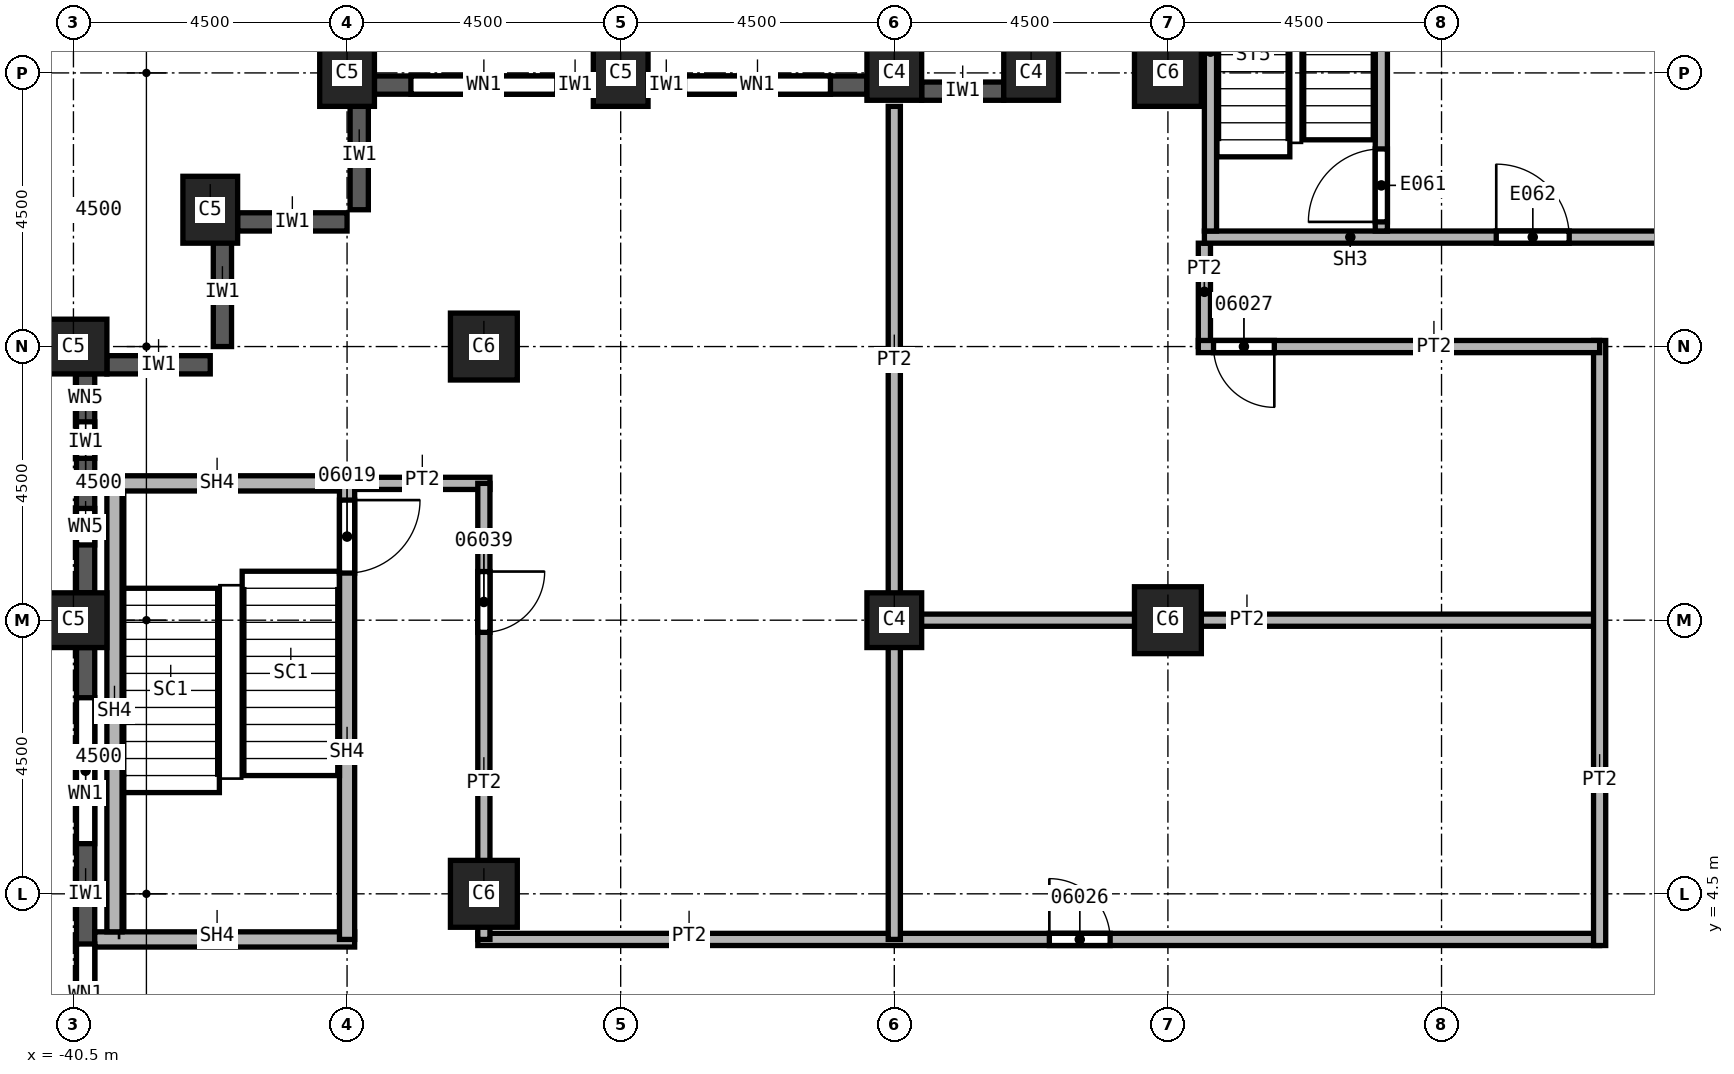
"""IFC4 building model, lengths in metres.
Left out: names, types, materials, properties, quantities, classifications, styles, units other than length and angle.
Written with IfcOpenShell. Run it as: python <this file> out.ifc"""

import sys

from ifc_helpers import new_model, si_unit, direction, frame, frame_2d, origin, origin_2d, place, context, subcontext, project, spatial, rectangle, extrude, element, fill, save


model = new_model("IFC4")
c1 = context("Model", 3, precision=1e-05, world=origin(), true_north=direction((0.0, 1.0)))
c2 = subcontext(c1, "Body", "Model", "MODEL_VIEW")
j1 = project(units=[si_unit("LENGTHUNIT", "METRE"), si_unit("PLANEANGLEUNIT", "RADIAN")], contexts=[c1])
p1 = place(None, origin())
s1 = spatial("IfcSite", under=j1, at=p1, CompositionType="ELEMENT")
p2 = place(p1, origin())
s2 = spatial("IfcBuilding", under=s1, at=p2, CompositionType="ELEMENT")
p3 = place(p2, frame((0.0, 0.0, 126.0)))
s3 = spatial("IfcBuildingStorey", under=s2, at=p3, CompositionType="ELEMENT", Elevation=126.0)
for number, where, z_axis, x_axis in (
    (1, (-40.5, 9.0, 0.0), (0.0, 0.0, 1.0), (0.0, 1.0, 0.0)),
    (2, (-40.5, 13.5, 0.0), (0.0, 0.0, 1.0), (0.0, 1.0, 0.0)),
    (3, (-38.25, 15.75, 0.0), (0.0, 0.0, 1.0), (1.0, 0.0, 0.0)),
    (4, (-31.5, 18.0, 0.0), (0.0, 0.0, 1.0), (1.0, 0.0, 0.0)),
    (5, (-36.0, 18.0, 0.0), (0.0, 0.0, 1.0), (1.0, 0.0, 0.0)),
):
    element("IfcColumn", number, at=place(p3, frame(where, z_axis=z_axis, x_axis=x_axis)), inside=s3, PredefinedType="COLUMN", context=c2, shape_type="SweptSolid", body=[
        extrude(rectangle(XDim=0.9, YDim=1.1, at=origin_2d()), origin(), (0.0, 0.0, 1.0), 3.7),
    ])
for number, where, z_axis, x_axis in (
    (6, (-33.75, 4.5, 0.0), (0.0, 0.0, 1.0), (1.0, 0.0, 0.0)),
    (7, (-33.75, 13.5, 0.0), (0.0, 0.0, 1.0), (1.0, 0.0, 0.0)),
    (8, (-22.5, 9.0, 0.0), (0.0, 0.0, 1.0), (1.0, 0.0, 0.0)),
    (9, (-22.5, 18.0, 0.0), (0.0, 0.0, 1.0), (1.0, 0.0, 0.0)),
):
    element("IfcColumn", number, at=place(p3, frame(where, z_axis=z_axis, x_axis=x_axis)), inside=s3, PredefinedType="COLUMN", context=c2, shape_type="SweptSolid", body=[
        extrude(rectangle(XDim=1.1, YDim=1.1, at=origin_2d()), origin(), (0.0, 0.0, 1.0), 3.7),
    ])
for number, where, z_axis, x_axis in (
    (10, (-27.0, 9.0, 0.0), (0.0, 0.0, 1.0), (1.0, 0.0, 0.0)),
    (11, (-27.0, 18.0, 0.0), (0.0, 0.0, 1.0), (1.0, 0.0, 0.0)),
    (12, (-24.75, 18.0, 0.0), (0.0, 0.0, 1.0), (1.0, 0.0, 0.0)),
):
    element("IfcColumn", number, at=place(p3, frame(where, z_axis=z_axis, x_axis=x_axis)), inside=s3, PredefinedType="COLUMN", context=c2, shape_type="SweptSolid", body=[
        extrude(rectangle(XDim=0.9, YDim=0.9, at=origin_2d()), origin(), (0.0, 0.0, 1.0), 3.7),
    ])
for number, where, z_axis, x_axis in (
    (13, (-35.8, 17.55, 0.0), (0.0, 0.0, 1.0), (0.0, -1.0, 0.0)),
    (14, (-37.8, 15.55, 0.0), (0.0, 0.0, 1.0), (1.0, 0.0, 0.0)),
    (15, (-38.05, 15.3, 0.0), (0.0, 0.0, 1.0), (0.0, -1.0, 0.0)),
):
    element("IfcWall", number, at=place(p3, frame(where, z_axis=z_axis, x_axis=x_axis)), inside=s3, PredefinedType="SOLIDWALL", context=c2, shape_type="SweptSolid", body=[
        extrude(rectangle(XDim=1.8, YDim=0.3, at=frame_2d((0.9, 0.0))), origin(), (0.0, 0.0, 1.0), 3.1),
    ])
p4 = place(p3, frame((-39.95, 13.2, 0.0), z_axis=(0.0, 0.0, 1.0), x_axis=(1.0, 0.0, 0.0)))
e16 = element("IfcWall", 16, at=p4, inside=s3, PredefinedType="SOLIDWALL", context=c2, shape_type="SweptSolid", body=[
    extrude(rectangle(XDim=1.7, YDim=0.3, at=frame_2d((0.85, 0.0))), origin(), (0.0, 0.0, 1.0), 3.1),
])
p5 = place(p3, frame((-25.2, 17.7, 0.0), z_axis=(0.0, 0.0, 1.0), x_axis=(-1.0, 0.0, 0.0)))
e17 = element("IfcWall", 17, at=p5, inside=s3, PredefinedType="SOLIDWALL", context=c2, shape_type="SweptSolid", body=[
    extrude(rectangle(XDim=1.35, YDim=0.3, at=frame_2d((0.675, 0.0))), origin(), (0.0, 0.0, 1.0), 3.1),
])
p6 = place(p3, frame((-27.45, 17.8, 0.0), z_axis=(0.0, 0.0, 1.0), x_axis=(-1.0, 0.0, 0.0)))
e18 = element("IfcWall", 18, at=p6, inside=s3, PredefinedType="SOLIDWALL", context=c2, shape_type="SweptSolid", body=[
    extrude(rectangle(XDim=3.6, YDim=0.3, at=frame_2d((1.8, 0.0))), origin(), (0.0, 0.0, 1.0), 3.1),
])
p7 = place(p6, frame((0.6, 0.0, 0.8)))
e19 = element("IfcOpeningElement", 19, at=p7, cuts=e18, PredefinedType="OPENING", context=c2, shape_type="SweptSolid", body=[
    extrude(rectangle(XDim=2.4, YDim=1.95, at=frame_2d((1.2, 0.975))), frame((0.0, 0.15, 0.0), z_axis=(0.0, -1.0, 0.0), x_axis=(1.0, 0.0, 0.0)), (0.0, 0.0, 1.0), 0.3),
])
p8 = place(p3, frame((-31.95, 17.8, 0.0), z_axis=(0.0, 0.0, 1.0), x_axis=(-1.0, 0.0, 0.0)))
e20 = element("IfcWall", 20, at=p8, inside=s3, PredefinedType="SOLIDWALL", context=c2, shape_type="SweptSolid", body=[
    extrude(rectangle(XDim=3.6, YDim=0.3, at=frame_2d((1.8, 0.0))), origin(), (0.0, 0.0, 1.0), 3.1),
])
p9 = place(p8, frame((0.6, 0.0, 0.8)))
e21 = element("IfcOpeningElement", 21, at=p9, cuts=e20, PredefinedType="OPENING", context=c2, shape_type="SweptSolid", body=[
    extrude(rectangle(XDim=2.4, YDim=1.95, at=frame_2d((1.2, 0.975))), frame((0.0, 0.15, 0.0), z_axis=(0.0, -1.0, 0.0), x_axis=(1.0, 0.0, 0.0)), (0.0, 0.0, 1.0), 0.3),
])
p10 = place(p3, frame((-40.3, 13.05, 0.0), z_axis=(0.0, 0.0, 1.0), x_axis=(0.0, -1.0, 0.0)))
e22 = element("IfcWall", 22, at=p10, inside=s3, PredefinedType="SOLIDWALL", context=c2, shape_type="SweptSolid", body=[
    extrude(rectangle(XDim=3.6, YDim=0.3, at=frame_2d((1.8, 0.0))), origin(), (0.0, 0.0, 1.0), 3.1),
])
p11 = place(p10, frame((0.788, 0.0, 0.8)))
e23 = element("IfcOpeningElement", 23, at=p11, cuts=e22, PredefinedType="OPENING", context=c2, shape_type="SweptSolid", body=[
    extrude(rectangle(XDim=0.6, YDim=1.95, at=frame_2d((0.3, 0.975))), frame((0.0, 0.15, 0.0), z_axis=(0.0, -1.0, 0.0), x_axis=(1.0, 0.0, 0.0)), (0.0, 0.0, 1.0), 0.3),
])
p12 = place(p10, frame((2.212, 0.0, 0.8)))
e24 = element("IfcOpeningElement", 24, at=p12, cuts=e22, PredefinedType="OPENING", context=c2, shape_type="SweptSolid", body=[
    extrude(rectangle(XDim=0.6, YDim=1.95, at=frame_2d((0.3, 0.975))), frame((0.0, 0.15, 0.0), z_axis=(0.0, -1.0, 0.0), x_axis=(1.0, 0.0, 0.0)), (0.0, 0.0, 1.0), 0.3),
])
p13 = place(p3, frame((-40.3, 8.55, 0.0), z_axis=(0.0, 0.0, 1.0), x_axis=(0.0, -1.0, 0.0)))
e25 = element("IfcWall", 25, at=p13, inside=s3, PredefinedType="SOLIDWALL", context=c2, shape_type="SweptSolid", body=[
    extrude(rectangle(XDim=8.1, YDim=0.3, at=frame_2d((4.05, 0.0))), origin(), (0.0, 0.0, 1.0), 3.1),
])
p14 = place(p13, frame((0.825, 0.0, 0.8)))
e26 = element("IfcOpeningElement", 26, at=p14, cuts=e25, PredefinedType="OPENING", context=c2, shape_type="SweptSolid", body=[
    extrude(rectangle(XDim=2.4, YDim=1.95, at=frame_2d((1.2, 0.975))), frame((0.0, 0.15, 0.0), z_axis=(0.0, -1.0, 0.0), x_axis=(1.0, 0.0, 0.0)), (0.0, 0.0, 1.0), 0.3),
])
p15 = place(p13, frame((4.875, 0.0, 0.8)))
e27 = element("IfcOpeningElement", 27, at=p15, cuts=e25, PredefinedType="OPENING", context=c2, shape_type="SweptSolid", body=[
    extrude(rectangle(XDim=2.4, YDim=1.95, at=frame_2d((1.2, 0.975))), frame((0.0, 0.15, 0.0), z_axis=(0.0, -1.0, 0.0), x_axis=(1.0, 0.0, 0.0)), (0.0, 0.0, 1.0), 0.3),
])
p16 = place(p3, frame((-36.0, 11.25, 0.0), z_axis=(0.0, 0.0, 1.0), x_axis=(1.0, 0.0, 0.0)))
e28 = element("IfcWall", 28, at=p16, inside=s3, PredefinedType="PARTITIONING", context=c2, shape_type="SweptSolid", body=[
    extrude(rectangle(XDim=2.35, YDim=0.2, at=frame_2d((1.175, 0.0))), origin(), (0.0, 0.0, 1.0), 3.7),
])
p17 = place(p3, frame((-33.85, 3.75, 0.0), z_axis=(0.0, 0.0, 1.0), x_axis=(1.0, 0.0, 0.0)))
e29 = element("IfcWall", 29, at=p17, inside=s3, PredefinedType="PARTITIONING", context=c2, shape_type="SweptSolid", body=[
    extrude(rectangle(XDim=18.45, YDim=0.2, at=frame_2d((9.225, 0.0))), origin(), (0.0, 0.0, 1.0), 3.7),
])
p18 = place(p17, frame((9.4, 0.0, 0.0)))
e30 = element("IfcOpeningElement", 30, at=p18, cuts=e29, PredefinedType="OPENING", context=c2, shape_type="SweptSolid", body=[
    extrude(rectangle(XDim=1.0, YDim=2.1, at=frame_2d((0.5, 1.05))), frame((0.0, 0.1, 0.0), z_axis=(0.0, -1.0, 0.0), x_axis=(1.0, 0.0, 0.0)), (0.0, 0.0, 1.0), 0.2),
])
p19 = place(p3, frame((-33.75, 11.25, 0.0), z_axis=(0.0, 0.0, 1.0), x_axis=(0.0, -1.0, 0.0)))
e31 = element("IfcWall", 31, at=p19, inside=s3, PredefinedType="PARTITIONING", context=c2, shape_type="SweptSolid", body=[
    extrude(rectangle(XDim=7.5, YDim=0.2, at=frame_2d((3.75, 0.0))), origin(), (0.0, 0.0, 1.0), 3.7),
])
p20 = place(p19, frame((1.45, 0.0, 0.0)))
e32 = element("IfcOpeningElement", 32, at=p20, cuts=e31, PredefinedType="OPENING", context=c2, shape_type="SweptSolid", body=[
    extrude(rectangle(XDim=1.0, YDim=2.1, at=frame_2d((0.5, 1.05))), frame((0.0, 0.1, 0.0), z_axis=(0.0, -1.0, 0.0), x_axis=(1.0, 0.0, 0.0)), (0.0, 0.0, 1.0), 0.2),
])
p21 = place(p3, frame((-27.1, 9.0, 0.0), z_axis=(0.0, 0.0, 1.0), x_axis=(1.0, 0.0, 0.0)))
e33 = element("IfcWall", 33, at=p21, inside=s3, PredefinedType="PARTITIONING", context=c2, shape_type="SweptSolid", body=[
    extrude(rectangle(XDim=11.7, YDim=0.2, at=frame_2d((5.85, 0.0))), origin(), (0.0, 0.0, 1.0), 3.7),
])
p22 = place(p3, frame((-27.0, 3.75, 0.0), z_axis=(0.0, 0.0, 1.0), x_axis=(0.0, 1.0, 0.0)))
e34 = element("IfcWall", 34, at=p22, inside=s3, PredefinedType="PARTITIONING", context=c2, shape_type="SweptSolid", body=[
    extrude(rectangle(XDim=13.7, YDim=0.2, at=frame_2d((6.85, 0.0))), origin(), (0.0, 0.0, 1.0), 3.7),
])
p23 = place(p3, frame((-21.9, 13.5, 0.0), z_axis=(0.0, 0.0, 1.0), x_axis=(0.0, 1.0, 0.0)))
e35 = element("IfcWall", 35, at=p23, inside=s3, PredefinedType="PARTITIONING", context=c2, shape_type="SweptSolid", body=[
    extrude(rectangle(XDim=1.7, YDim=0.2, at=frame_2d((0.85, 0.0))), origin(), (0.0, 0.0, 1.0), 3.7),
])
p24 = place(p3, frame((-15.4, 3.65, 0.0), z_axis=(0.0, 0.0, 1.0), x_axis=(0.0, 1.0, 0.0)))
e36 = element("IfcWall", 36, at=p24, inside=s3, PredefinedType="PARTITIONING", context=c2, shape_type="SweptSolid", body=[
    extrude(rectangle(XDim=9.95, YDim=0.2, at=frame_2d((4.975, 0.0))), origin(), (0.0, 0.0, 1.0), 3.7),
])
p25 = place(p3, frame((-15.4, 13.5, 0.0), z_axis=(0.0, 0.0, 1.0), x_axis=(-1.0, 0.0, 0.0)))
e37 = element("IfcWall", 37, at=p25, inside=s3, PredefinedType="PARTITIONING", context=c2, shape_type="SweptSolid", body=[
    extrude(rectangle(XDim=6.6, YDim=0.2, at=frame_2d((3.3, 0.0))), origin(), (0.0, 0.0, 1.0), 3.7),
])
p26 = place(p25, frame((5.35, 0.0, 0.0)))
e38 = element("IfcOpeningElement", 38, at=p26, cuts=e37, PredefinedType="OPENING", context=c2, shape_type="SweptSolid", body=[
    extrude(rectangle(XDim=1.0, YDim=2.1, at=frame_2d((0.5, 1.05))), frame((0.0, 0.1, 0.0), z_axis=(0.0, -1.0, 0.0), x_axis=(1.0, 0.0, 0.0)), (0.0, 0.0, 1.0), 0.2),
])
p27 = place(p3, frame((-40.15, 3.75, 0.0), z_axis=(0.0, 0.0, 1.0), x_axis=(1.0, 0.0, 0.0)))
e39 = element("IfcWall", 39, at=p27, inside=s3, PredefinedType="SOLIDWALL", context=c2, shape_type="SweptSolid", body=[
    extrude(rectangle(XDim=4.275, YDim=0.25, at=frame_2d((2.137, 0.0))), origin(), (0.0, 0.0, 1.0), 3.7),
])
p28 = place(p3, frame((-40.15, 11.25, 0.0), z_axis=(0.0, 0.0, 1.0), x_axis=(1.0, 0.0, 0.0)))
e40 = element("IfcWall", 40, at=p28, inside=s3, PredefinedType="SOLIDWALL", context=c2, shape_type="SweptSolid", body=[
    extrude(rectangle(XDim=4.15, YDim=0.25, at=frame_2d((2.075, 0.0))), origin(), (0.0, 0.0, 1.0), 3.7),
])
p29 = place(p3, frame((-36.0, 11.375, 0.0), z_axis=(0.0, 0.0, 1.0), x_axis=(0.0, -1.0, 0.0)))
e41 = element("IfcWall", 41, at=p29, inside=s3, PredefinedType="SOLIDWALL", context=c2, shape_type="SweptSolid", body=[
    extrude(rectangle(XDim=7.625, YDim=0.25, at=frame_2d((3.812, 0.0))), origin(), (0.0, 0.0, 1.0), 3.7),
])
p30 = place(p29, frame((0.4, 0.0, 0.0)))
e42 = element("IfcOpeningElement", 42, at=p30, cuts=e41, PredefinedType="OPENING", context=c2, shape_type="SweptSolid", body=[
    extrude(rectangle(XDim=1.2, YDim=2.1, at=frame_2d((0.6, 1.05))), frame((0.0, 0.125, 0.0), z_axis=(0.0, -1.0, 0.0), x_axis=(1.0, 0.0, 0.0)), (0.0, 0.0, 1.0), 0.25),
])
p31 = place(p3, frame((-21.9, 15.3, 0.0), z_axis=(0.0, 0.0, 1.0), x_axis=(1.0, 0.0, 0.0)))
e43 = element("IfcWall", 43, at=p31, inside=s3, PredefinedType="SOLIDWALL", context=c2, shape_type="SweptSolid", body=[
    extrude(rectangle(XDim=8.275, YDim=0.2, at=frame_2d((4.137, 0.0))), origin(), (0.0, 0.0, 1.0), 3.7),
])
p32 = place(p31, frame((4.8, 0.0, 0.0)))
e44 = element("IfcOpeningElement", 44, at=p32, cuts=e43, PredefinedType="OPENING", context=c2, shape_type="SweptSolid", body=[
    extrude(rectangle(XDim=1.2, YDim=2.1, at=frame_2d((0.6, 1.05))), frame((0.0, 0.1, 0.0), z_axis=(0.0, -1.0, 0.0), x_axis=(1.0, 0.0, 0.0)), (0.0, 0.0, 1.0), 0.2),
])
p33 = place(p3, frame((-21.8, 15.4, 0.0), z_axis=(0.0, 0.0, 1.0), x_axis=(0.0, 1.0, 0.0)))
e45 = element("IfcWall", 45, at=p33, inside=s3, PredefinedType="SOLIDWALL", context=c2, shape_type="SweptSolid", body=[
    extrude(rectangle(XDim=5.9, YDim=0.2, at=frame_2d((2.95, 0.0))), origin(), (0.0, 0.0, 1.0), 3.7),
])
p34 = place(p3, frame((-18.99, 15.4, 0.0), z_axis=(0.0, 0.0, 1.0), x_axis=(0.0, 1.0, 0.0)))
e46 = element("IfcWall", 46, at=p34, inside=s3, PredefinedType="SOLIDWALL", context=c2, shape_type="SweptSolid", body=[
    extrude(rectangle(XDim=5.9, YDim=0.2, at=frame_2d((2.95, 0.0))), origin(), (0.0, 0.0, 1.0), 3.7),
])
p35 = place(p34, frame((0.15, 0.0, 0.0)))
e47 = element("IfcOpeningElement", 47, at=p35, cuts=e46, PredefinedType="OPENING", context=c2, shape_type="SweptSolid", body=[
    extrude(rectangle(XDim=1.2, YDim=2.1, at=frame_2d((0.6, 1.05))), frame((0.0, 0.1, 0.0), z_axis=(0.0, -1.0, 0.0), x_axis=(1.0, 0.0, 0.0)), (0.0, 0.0, 1.0), 0.2),
])
p36 = place(p3, frame((-39.825, 3.875, 0.0), z_axis=(0.0, 0.0, 1.0), x_axis=(0.0, 1.0, 0.0)))
e48 = element("IfcWall", 48, at=p36, inside=s3, PredefinedType="SOLIDWALL", context=c2, shape_type="SweptSolid", body=[
    extrude(rectangle(XDim=7.25, YDim=0.25, at=frame_2d((3.625, 0.0))), origin(), (0.0, 0.0, 1.0), 3.7),
])
p37 = place(p7, origin())
e49 = element("IfcWindow", 49, at=p37, inside=s3, PartitioningType="SINGLE_PANEL", PredefinedType="WINDOW", context=c2, shape_type="SweptSolid", body=[
    extrude(rectangle(XDim=2.4, YDim=1.95, at=frame_2d((1.2, 0.975))), frame((0.0, 0.03, 0.0), z_axis=(0.0, -1.0, 0.0), x_axis=(1.0, 0.0, 0.0)), (0.0, 0.0, 1.0), 0.06),
])
fill(e19, e49)
p38 = place(p9, origin())
e50 = element("IfcWindow", 50, at=p38, inside=s3, PartitioningType="SINGLE_PANEL", PredefinedType="WINDOW", context=c2, shape_type="SweptSolid", body=[
    extrude(rectangle(XDim=2.4, YDim=1.95, at=frame_2d((1.2, 0.975))), frame((0.0, 0.03, 0.0), z_axis=(0.0, -1.0, 0.0), x_axis=(1.0, 0.0, 0.0)), (0.0, 0.0, 1.0), 0.06),
])
fill(e21, e50)
p39 = place(p14, origin())
e51 = element("IfcWindow", 51, at=p39, inside=s3, PartitioningType="SINGLE_PANEL", PredefinedType="WINDOW", context=c2, shape_type="SweptSolid", body=[
    extrude(rectangle(XDim=2.4, YDim=1.95, at=frame_2d((1.2, 0.975))), frame((0.0, 0.03, 0.0), z_axis=(0.0, -1.0, 0.0), x_axis=(1.0, 0.0, 0.0)), (0.0, 0.0, 1.0), 0.06),
])
fill(e26, e51)
p40 = place(p15, origin())
e52 = element("IfcWindow", 52, at=p40, inside=s3, PartitioningType="SINGLE_PANEL", PredefinedType="WINDOW", context=c2, shape_type="SweptSolid", body=[
    extrude(rectangle(XDim=2.4, YDim=1.95, at=frame_2d((1.2, 0.975))), frame((0.0, 0.03, 0.0), z_axis=(0.0, -1.0, 0.0), x_axis=(1.0, 0.0, 0.0)), (0.0, 0.0, 1.0), 0.06),
])
fill(e27, e52)
p41 = place(p30, origin())
e53 = element("IfcDoor", 53, at=p41, inside=s3, OperationType="SINGLE_SWING_RIGHT", PredefinedType="DOOR", context=c2, shape_type="SweptSolid", body=[
    extrude(rectangle(XDim=1.2, YDim=2.1, at=frame_2d((0.6, 1.05))), frame((0.0, 0.025, 0.0), z_axis=(0.0, -1.0, 0.0), x_axis=(1.0, 0.0, 0.0)), (0.0, 0.0, 1.0), 0.05),
])
fill(e42, e53)
p42 = place(p18, origin())
e54 = element("IfcDoor", 54, at=p42, inside=s3, OperationType="SINGLE_SWING_LEFT", PredefinedType="DOOR", context=c2, shape_type="SweptSolid", body=[
    extrude(rectangle(XDim=1.0, YDim=2.1, at=frame_2d((0.5, 1.05))), frame((0.0, 0.025, 0.0), z_axis=(0.0, -1.0, 0.0), x_axis=(1.0, 0.0, 0.0)), (0.0, 0.0, 1.0), 0.05),
])
fill(e30, e54)
p43 = place(p26, origin())
e55 = element("IfcDoor", 55, at=p43, inside=s3, OperationType="SINGLE_SWING_RIGHT", PredefinedType="DOOR", context=c2, shape_type="SweptSolid", body=[
    extrude(rectangle(XDim=1.0, YDim=2.1, at=frame_2d((0.5, 1.05))), frame((0.0, 0.025, 0.0), z_axis=(0.0, -1.0, 0.0), x_axis=(1.0, 0.0, 0.0)), (0.0, 0.0, 1.0), 0.05),
])
fill(e38, e55)
p44 = place(p20, origin())
e56 = element("IfcDoor", 56, at=p44, inside=s3, OperationType="SINGLE_SWING_RIGHT", PredefinedType="DOOR", context=c2, shape_type="SweptSolid", body=[
    extrude(rectangle(XDim=1.0, YDim=2.1, at=frame_2d((0.5, 1.05))), frame((0.0, 0.025, 0.0), z_axis=(0.0, -1.0, 0.0), x_axis=(1.0, 0.0, 0.0)), (0.0, 0.0, 1.0), 0.05),
])
fill(e32, e56)
p45 = place(p35, origin())
e57 = element("IfcDoor", 57, at=p45, inside=s3, OperationType="SINGLE_SWING_LEFT", PredefinedType="DOOR", context=c2, shape_type="SweptSolid", body=[
    extrude(rectangle(XDim=1.2, YDim=2.1, at=frame_2d((0.6, 1.05))), frame((0.0, 0.025, 0.0), z_axis=(0.0, -1.0, 0.0), x_axis=(1.0, 0.0, 0.0)), (0.0, 0.0, 1.0), 0.05),
])
fill(e47, e57)
p46 = place(p32, origin())
e58 = element("IfcDoor", 58, at=p46, inside=s3, OperationType="SINGLE_SWING_RIGHT", PredefinedType="DOOR", context=c2, shape_type="SweptSolid", body=[
    extrude(rectangle(XDim=1.2, YDim=2.1, at=frame_2d((0.6, 1.05))), frame((0.0, 0.025, 0.0), z_axis=(0.0, -1.0, 0.0), x_axis=(1.0, 0.0, 0.0)), (0.0, 0.0, 1.0), 0.05),
])
fill(e44, e58)
p47 = place(p11, origin())
e59 = element("IfcWindow", 59, at=p47, inside=s3, PartitioningType="SINGLE_PANEL", PredefinedType="WINDOW", context=c2, shape_type="SweptSolid", body=[
    extrude(rectangle(XDim=0.6, YDim=1.95, at=frame_2d((0.3, 0.975))), frame((0.0, 0.03, 0.0), z_axis=(0.0, -1.0, 0.0), x_axis=(1.0, 0.0, 0.0)), (0.0, 0.0, 1.0), 0.06),
])
fill(e23, e59)
p48 = place(p12, origin())
e60 = element("IfcWindow", 60, at=p48, inside=s3, PartitioningType="SINGLE_PANEL", PredefinedType="WINDOW", context=c2, shape_type="SweptSolid", body=[
    extrude(rectangle(XDim=0.6, YDim=1.95, at=frame_2d((0.3, 0.975))), frame((0.0, 0.03, 0.0), z_axis=(0.0, -1.0, 0.0), x_axis=(1.0, 0.0, 0.0)), (0.0, 0.0, 1.0), 0.06),
])
fill(e24, e60)
save(model, sys.argv[1])
